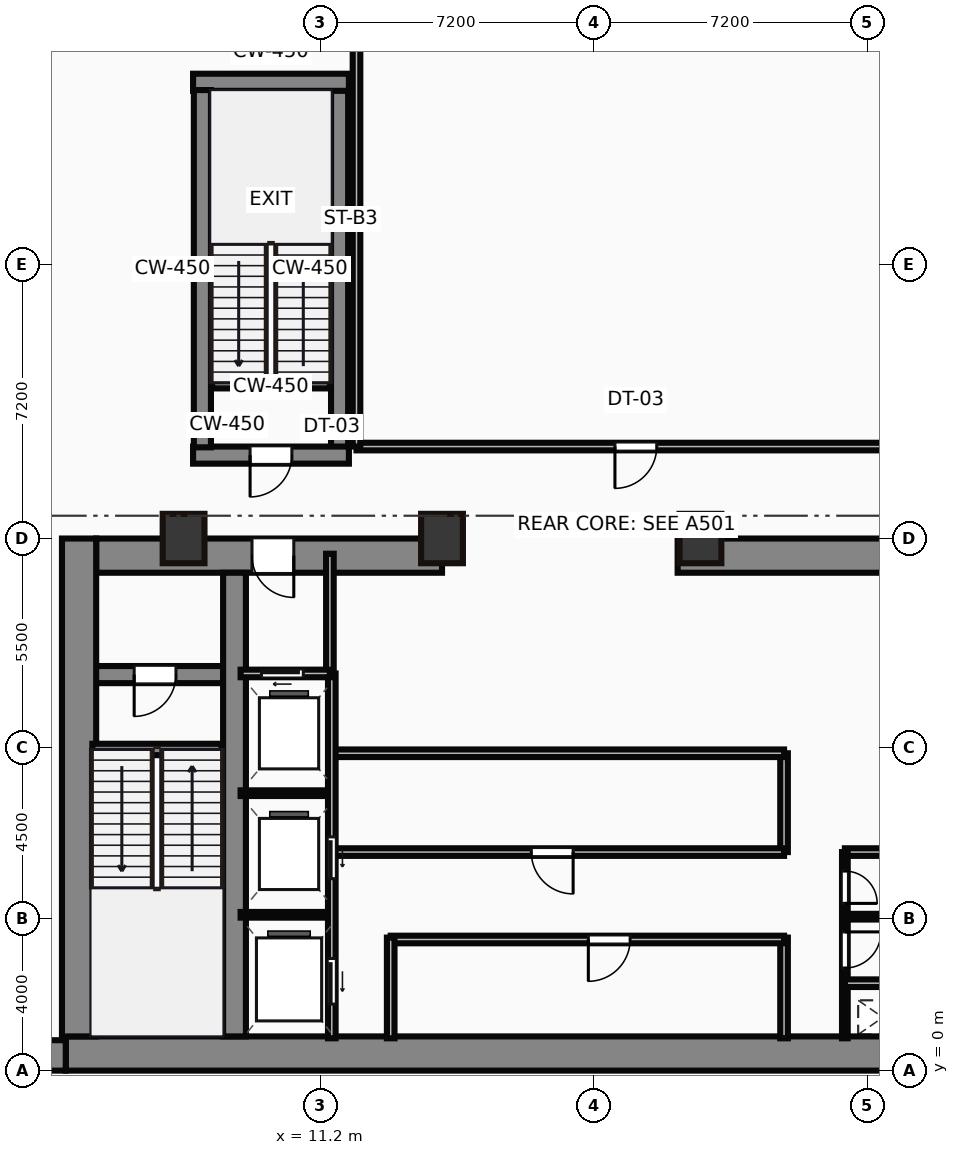
"""IFC4 building model, lengths in metres.
Left out: names, types, materials, properties, quantities, classifications, styles, units other than length and angle.
Written with IfcOpenShell. Run it as: python <this file> out.ifc"""

import sys

from ifc_helpers import new_model, si_unit, direction, frame, frame_2d, origin, origin_2d, place, context, subcontext, project, spatial, rectangle, hollow_rectangle, extrude, source, transform, mapped, element, fill, save


model = new_model("IFC4")
c1 = context("Model", 3, precision=1e-05, world=origin(), true_north=direction((0.0, 1.0)))
c2 = subcontext(c1, "Body", "Model", "MODEL_VIEW")
j1 = project(units=[si_unit("LENGTHUNIT", "METRE"), si_unit("PLANEANGLEUNIT", "RADIAN")], contexts=[c1])
p1 = place(None, origin())
s1 = spatial("IfcSite", under=j1, at=p1, CompositionType="ELEMENT")
p2 = place(p1, origin())
s2 = spatial("IfcBuilding", under=s1, at=p2, CompositionType="ELEMENT")
p3 = place(p2, frame((0.0, 0.0, -10.0)))
s3 = spatial("IfcBuildingStorey", under=s2, at=p3, CompositionType="ELEMENT", Elevation=-10.0)
m1 = source(origin(), c2, "Body", "SweptSolid", [
    extrude(rectangle(XDim=4.5, YDim=0.8, at=frame_2d((2.25, 0.0))), origin(), (0.0, 0.0, 1.0), 5.0),
])
p4 = place(p3, frame((0.0, 0.4, 0.0), z_axis=(0.0, 0.0, 1.0), x_axis=(1.0, 0.0, 0.0)))
e1 = element("IfcWall", 1, at=p4, inside=s3, PredefinedType="USERDEFINED", context=c2, shape_type="MappedRepresentation", body=[
    mapped(m1, transform((0.0, 0.0, 0.0))),
])
m2 = source(origin(), c2, "Body", "SweptSolid", [
    extrude(rectangle(XDim=29.5, YDim=0.9, at=frame_2d((14.75, 0.0))), origin(), (0.0, 0.0, 1.0), 5.0),
])
p5 = place(p3, frame((4.5, 0.45, 0.0), z_axis=(0.0, 0.0, 1.0), x_axis=(1.0, 0.0, 0.0)))
e2 = element("IfcWall", 2, at=p5, inside=s3, PredefinedType="SHEAR", context=c2, shape_type="MappedRepresentation", body=[
    mapped(m2, transform((0.0, 0.0, 0.0))),
])
m3 = source(origin(), c2, "Body", "SweptSolid", [
    extrude(rectangle(XDim=13.1, YDim=0.9, at=frame_2d((6.55, 0.0))), origin(), (0.0, 0.0, 1.0), 5.0),
])
p6 = place(p3, frame((4.85, 0.9, 0.0), z_axis=(0.0, 0.0, 1.0), x_axis=(0.0, 1.0, 0.0)))
e3 = element("IfcWall", 3, at=p6, inside=s3, PredefinedType="SHEAR", context=c2, shape_type="MappedRepresentation", body=[
    mapped(m3, transform((0.0, 0.0, 0.0))),
])
m4 = source(origin(), c2, "Body", "SweptSolid", [
    extrude(rectangle(XDim=9.1, YDim=0.9, at=frame_2d((4.55, 0.0))), origin(), (0.0, 0.0, 1.0), 4.55),
])
p7 = place(p3, frame((5.3, 13.55, 0.45), z_axis=(0.0, 0.0, 1.0), x_axis=(1.0, 0.0, 0.0)))
e4 = element("IfcWall", 4, at=p7, inside=s3, PredefinedType="SHEAR", context=c2, shape_type="MappedRepresentation", body=[
    mapped(m4, transform((0.0, 0.0, 0.0))),
])
p8 = place(p7, frame((4.1, 0.0, 0.0)))
e5 = element("IfcOpeningElement", 5, at=p8, cuts=e4, PredefinedType="OPENING", context=c2, shape_type="SweptSolid", body=[
    extrude(rectangle(XDim=1.1, YDim=2.15, at=frame_2d((0.55, 1.075))), frame((0.0, 0.46, 0.0), z_axis=(0.0, -1.0, 0.0), x_axis=(1.0, 0.0, 0.0)), (0.0, 0.0, 1.0), 0.92),
])
m5 = source(origin(), c2, "Body", "SweptSolid", [
    extrude(rectangle(XDim=12.6, YDim=0.9, at=frame_2d((6.3, 0.0))), origin(), (0.0, 0.0, 1.0), 4.55),
])
p9 = place(p3, frame((20.6, 13.55, 0.45), z_axis=(0.0, 0.0, 1.0), x_axis=(1.0, 0.0, 0.0)))
e6 = element("IfcWall", 6, at=p9, inside=s3, PredefinedType="SHEAR", context=c2, shape_type="MappedRepresentation", body=[
    mapped(m5, transform((0.0, 0.0, 0.0))),
])
p10 = place(p9, frame((9.25, 0.0, 0.0)))
e7 = element("IfcOpeningElement", 7, at=p10, cuts=e6, PredefinedType="OPENING", context=c2, shape_type="SweptSolid", body=[
    extrude(rectangle(XDim=1.1, YDim=2.15, at=frame_2d((0.55, 1.075))), frame((0.0, 0.46, 0.0), z_axis=(0.0, -1.0, 0.0), x_axis=(1.0, 0.0, 0.0)), (0.0, 0.0, 1.0), 0.92),
])
m6 = source(origin(), c2, "Body", "SweptSolid", [
    extrude(rectangle(XDim=12.2, YDim=0.6, at=frame_2d((6.1, 0.0))), origin(), (0.0, 0.0, 1.0), 5.0),
])
p11 = place(p3, frame((8.94, 0.9, 0.0), z_axis=(0.0, 0.0, 1.0), x_axis=(0.0, 1.0, 0.0)))
e8 = element("IfcWall", 8, at=p11, inside=s3, PredefinedType="SHEAR", context=c2, shape_type="MappedRepresentation", body=[
    mapped(m6, transform((0.0, 0.0, 0.0))),
])
m7 = source(origin(), c2, "Body", "SweptSolid", [
    extrude(rectangle(XDim=3.39, YDim=0.45, at=frame_2d((1.695, 0.0))), origin(), (0.0, 0.0, 1.0), 4.55),
])
p12 = place(p3, frame((5.25, 10.42, 0.45), z_axis=(0.0, 0.0, 1.0), x_axis=(1.0, 0.0, 0.0)))
e9 = element("IfcWall", 9, at=p12, inside=s3, PredefinedType="SHEAR", context=c2, shape_type="MappedRepresentation", body=[
    mapped(m7, transform((0.0, 0.0, 0.0))),
])
p13 = place(p12, frame((1.05, 0.0, 0.0)))
e10 = element("IfcOpeningElement", 10, at=p13, cuts=e9, PredefinedType="OPENING", context=c2, shape_type="SweptSolid", body=[
    extrude(rectangle(XDim=1.1, YDim=2.15, at=frame_2d((0.55, 1.075))), frame((0.0, 0.235, 0.0), z_axis=(0.0, -1.0, 0.0), x_axis=(1.0, 0.0, 0.0)), (0.0, 0.0, 1.0), 0.47),
])
m8 = source(origin(), c2, "Body", "SweptSolid", [
    extrude(rectangle(XDim=3.4, YDim=0.3, at=frame_2d((1.7, 0.0))), origin(), (0.0, 0.0, 1.0), 0.75),
])
p14 = place(p3, frame((5.2, 8.45, -0.3), z_axis=(0.0, 0.0, 1.0), x_axis=(1.0, 0.0, 0.0)))
e11 = element("IfcWall", 11, at=p14, inside=s3, PredefinedType="SHEAR", context=c2, shape_type="MappedRepresentation", body=[
    mapped(m8, transform((0.0, 0.0, 0.0))),
])
m9 = source(origin(), c2, "Body", "SweptSolid", [
    extrude(hollow_rectangle(XDim=1.1, YDim=1.3, WallThickness=0.055, at=origin_2d()), origin(), (0.0, 0.0, 1.0), 5.0),
])
for number, where, z_axis, x_axis in (
    (12, (7.6, 14.0, 0.0), (0.0, 0.0, 1.0), (1.0, 0.0, 0.0)),
    (13, (14.4, 14.0, 0.0), (0.0, 0.0, 1.0), (1.0, 0.0, 0.0)),
    (14, (21.2, 14.0, 0.0), (0.0, 0.0, 1.0), (1.0, 0.0, 0.0)),
):
    element("IfcColumn", number, at=place(p3, frame(where, z_axis=z_axis, x_axis=x_axis)), inside=s3, PredefinedType="PILASTER", context=c2, shape_type="MappedRepresentation", body=[
        mapped(m9, transform((0.0, 0.0, 0.0))),
    ])
m10 = source(origin(), c2, "Body", "SweptSolid", [
    extrude(rectangle(XDim=4.1, YDim=0.45, at=frame_2d((2.05, 0.0))), origin(), (0.0, 0.0, 1.0), 4.55),
])
p15 = place(p3, frame((7.85, 16.195, 0.45), z_axis=(0.0, 0.0, 1.0), x_axis=(1.0, 0.0, 0.0)))
e15 = element("IfcWall", 15, at=p15, inside=s3, PredefinedType="SHEAR", context=c2, shape_type="MappedRepresentation", body=[
    mapped(m10, transform((0.0, 0.0, 0.0))),
])
p16 = place(p15, frame((1.5, 0.0, 0.0)))
e16 = element("IfcOpeningElement", 16, at=p16, cuts=e15, PredefinedType="OPENING", context=c2, shape_type="SweptSolid", body=[
    extrude(rectangle(XDim=1.1, YDim=2.15, at=frame_2d((0.55, 1.075))), frame((0.0, 0.235, 0.0), z_axis=(0.0, -1.0, 0.0), x_axis=(1.0, 0.0, 0.0)), (0.0, 0.0, 1.0), 0.47),
])
m11 = source(origin(), c2, "Body", "SweptSolid", [
    extrude(rectangle(XDim=9.4, YDim=0.45, at=frame_2d((4.7, 0.0))), origin(), (0.0, 0.0, 1.0), 4.55),
])
for number, where, z_axis, x_axis in (
    (17, (8.095, 16.4, 0.45), (0.0, 0.0, 1.0), (0.0, 1.0, 0.0)),
    (18, (11.705, 16.4, 0.45), (0.0, 0.0, 1.0), (0.0, 1.0, 0.0)),
):
    element("IfcWall", number, at=place(p3, frame(where, z_axis=z_axis, x_axis=x_axis)), inside=s3, PredefinedType="SHEAR", context=c2, shape_type="MappedRepresentation", body=[
        mapped(m11, transform((0.0, 0.0, 0.0))),
    ])
p17 = place(p3, frame((7.85, 26.005, 0.45), z_axis=(0.0, 0.0, 1.0), x_axis=(1.0, 0.0, 0.0)))
e19 = element("IfcWall", 19, at=p17, inside=s3, PredefinedType="SHEAR", context=c2, shape_type="MappedRepresentation", body=[
    mapped(m10, transform((0.0, 0.0, 0.0))),
])
m12 = source(origin(), c2, "Body", "SweptSolid", [
    extrude(rectangle(XDim=3.1, YDim=0.3, at=frame_2d((1.55, 0.0))), origin(), (0.0, 0.0, 1.0), 0.3),
])
p18 = place(p3, frame((11.45, 18.1, -0.3), z_axis=(0.0, 0.0, 1.0), x_axis=(-1.0, 0.0, 0.0)))
e20 = element("IfcWall", 20, at=p18, inside=s3, PredefinedType="SHEAR", context=c2, shape_type="MappedRepresentation", body=[
    mapped(m12, transform((0.0, 0.0, 0.0))),
])
m13 = source(origin(), c2, "Body", "SweptSolid", [
    extrude(rectangle(XDim=3.18, YDim=0.2, at=frame_2d((1.59, 0.0))), origin(), (0.0, 0.0, 1.0), 4.25),
])
p19 = place(p3, frame((11.45, 10.42, 0.45), z_axis=(0.0, 0.0, 1.0), x_axis=(0.0, 1.0, 0.0)))
e21 = element("IfcWall", 21, at=p19, inside=s3, PredefinedType="PARTITIONING", context=c2, shape_type="MappedRepresentation", body=[
    mapped(m13, transform((0.0, 0.0, 0.0))),
])
m14 = source(origin(), c2, "Body", "SweptSolid", [
    extrude(rectangle(XDim=2.35, YDim=0.2, at=frame_2d((1.175, 0.0))), origin(), (0.0, 0.0, 1.0), 4.25),
])
p20 = place(p3, frame((9.1, 10.45, 0.45), z_axis=(0.0, 0.0, 1.0), x_axis=(1.0, 0.0, 0.0)))
e22 = element("IfcWall", 22, at=p20, inside=s3, PredefinedType="PARTITIONING", context=c2, shape_type="MappedRepresentation", body=[
    mapped(m14, transform((0.0, 0.0, 0.0))),
])
p21 = place(p20, frame((0.55, 0.0, 0.0)))
e23 = element("IfcOpeningElement", 23, at=p21, cuts=e22, PredefinedType="OPENING", context=c2, shape_type="SweptSolid", body=[
    extrude(rectangle(XDim=1.1, YDim=2.15, at=frame_2d((0.55, 1.075))), frame((0.0, 0.11, 0.0), z_axis=(0.0, -1.0, 0.0), x_axis=(1.0, 0.0, 0.0)), (0.0, 0.0, 1.0), 0.22),
])
m15 = source(origin(), c2, "Body", "SweptSolid", [
    extrude(rectangle(XDim=9.6, YDim=0.2, at=frame_2d((4.8, 0.0))), origin(), (0.0, 0.0, 1.0), 4.25),
])
p22 = place(p3, frame((11.5, 0.85, 0.45), z_axis=(0.0, 0.0, 1.0), x_axis=(0.0, 1.0, 0.0)))
e24 = element("IfcWall", 24, at=p22, inside=s3, PredefinedType="PARTITIONING", context=c2, shape_type="MappedRepresentation", body=[
    mapped(m15, transform((0.0, 0.0, 0.0))),
])
p23 = place(p22, frame((4.2, 0.0, 0.0)))
e25 = element("IfcOpeningElement", 25, at=p23, cuts=e24, PredefinedType="OPENING", context=c2, shape_type="SweptSolid", body=[
    extrude(rectangle(XDim=1.1, YDim=2.15, at=frame_2d((0.55, 1.075))), frame((0.0, 0.11, 0.0), z_axis=(0.0, -1.0, 0.0), x_axis=(1.0, 0.0, 0.0)), (0.0, 0.0, 1.0), 0.22),
])
p24 = place(p22, frame((0.9, 0.0, 0.0)))
e26 = element("IfcOpeningElement", 26, at=p24, cuts=e24, PredefinedType="OPENING", context=c2, shape_type="SweptSolid", body=[
    extrude(rectangle(XDim=1.2, YDim=2.15, at=frame_2d((0.6, 1.075))), frame((0.0, 0.11, 0.0), z_axis=(0.0, -1.0, 0.0), x_axis=(1.0, 0.0, 0.0)), (0.0, 0.0, 1.0), 0.22),
])
m16 = source(origin(), c2, "Body", "SweptSolid", [
    extrude(rectangle(XDim=2.4, YDim=0.15, at=frame_2d((1.2, 0.0))), origin(), (0.0, 0.0, 1.0), 4.25),
])
for number, where, z_axis, x_axis in (
    (27, (9.1, 4.1, 0.45), (0.0, 0.0, 1.0), (1.0, 0.0, 0.0)),
    (28, (9.1, 7.3, 0.45), (0.0, 0.0, 1.0), (1.0, 0.0, 0.0)),
):
    element("IfcWall", number, at=place(p3, frame(where, z_axis=z_axis, x_axis=x_axis)), inside=s3, PredefinedType="PARTITIONING", context=c2, shape_type="MappedRepresentation", body=[
        mapped(m16, transform((0.0, 0.0, 0.0))),
    ])
m17 = source(origin(), c2, "Body", "SweptSolid", [
    extrude(rectangle(XDim=2.65, YDim=0.2, at=frame_2d((1.325, 0.0))), origin(), (0.0, 0.0, 1.0), 4.25),
])
p25 = place(p3, frame((13.05, 0.85, 0.45), z_axis=(0.0, 0.0, 1.0), x_axis=(0.0, 1.0, 0.0)))
e29 = element("IfcWall", 29, at=p25, inside=s3, PredefinedType="PARTITIONING", context=c2, shape_type="MappedRepresentation", body=[
    mapped(m17, transform((0.0, 0.0, 0.0))),
])
m18 = source(origin(), c2, "Body", "SweptSolid", [
    extrude(rectangle(XDim=10.35, YDim=0.2, at=frame_2d((5.175, 0.0))), origin(), (0.0, 0.0, 1.0), 4.25),
])
p26 = place(p3, frame((13.05, 3.45, 0.45), z_axis=(0.0, 0.0, 1.0), x_axis=(1.0, 0.0, 0.0)))
e30 = element("IfcWall", 30, at=p26, inside=s3, PredefinedType="PARTITIONING", context=c2, shape_type="MappedRepresentation", body=[
    mapped(m18, transform((0.0, 0.0, 0.0))),
])
p27 = place(p26, frame((5.2, 0.0, 0.0)))
e31 = element("IfcOpeningElement", 31, at=p27, cuts=e30, PredefinedType="OPENING", context=c2, shape_type="SweptSolid", body=[
    extrude(rectangle(XDim=1.1, YDim=2.15, at=frame_2d((0.55, 1.075))), frame((0.0, 0.11, 0.0), z_axis=(0.0, -1.0, 0.0), x_axis=(1.0, 0.0, 0.0)), (0.0, 0.0, 1.0), 0.22),
])
p28 = place(p3, frame((23.4, 0.85, 0.45), z_axis=(0.0, 0.0, 1.0), x_axis=(0.0, 1.0, 0.0)))
e32 = element("IfcWall", 32, at=p28, inside=s3, PredefinedType="PARTITIONING", context=c2, shape_type="MappedRepresentation", body=[
    mapped(m17, transform((0.0, 0.0, 0.0))),
])
m19 = source(origin(), c2, "Body", "SweptSolid", [
    extrude(rectangle(XDim=11.85, YDim=0.2, at=frame_2d((5.925, 0.0))), origin(), (0.0, 0.0, 1.0), 4.25),
])
p29 = place(p3, frame((11.55, 5.75, 0.45), z_axis=(0.0, 0.0, 1.0), x_axis=(1.0, 0.0, 0.0)))
e33 = element("IfcWall", 33, at=p29, inside=s3, PredefinedType="PARTITIONING", context=c2, shape_type="MappedRepresentation", body=[
    mapped(m19, transform((0.0, 0.0, 0.0))),
])
p30 = place(p29, frame((5.2, 0.0, 0.0)))
e34 = element("IfcOpeningElement", 34, at=p30, cuts=e33, PredefinedType="OPENING", context=c2, shape_type="SweptSolid", body=[
    extrude(rectangle(XDim=1.1, YDim=2.15, at=frame_2d((0.55, 1.075))), frame((0.0, 0.11, 0.0), z_axis=(0.0, -1.0, 0.0), x_axis=(1.0, 0.0, 0.0)), (0.0, 0.0, 1.0), 0.22),
])
p31 = place(p3, frame((11.55, 8.35, 0.45), z_axis=(0.0, 0.0, 1.0), x_axis=(1.0, 0.0, 0.0)))
e35 = element("IfcWall", 35, at=p31, inside=s3, PredefinedType="PARTITIONING", context=c2, shape_type="MappedRepresentation", body=[
    mapped(m19, transform((0.0, 0.0, 0.0))),
])
m20 = source(origin(), c2, "Body", "SweptSolid", [
    extrude(rectangle(XDim=2.6, YDim=0.2, at=frame_2d((1.3, 0.0))), origin(), (0.0, 0.0, 1.0), 4.25),
])
p32 = place(p3, frame((23.4, 5.75, 0.45), z_axis=(0.0, 0.0, 1.0), x_axis=(0.0, 1.0, 0.0)))
e36 = element("IfcWall", 36, at=p32, inside=s3, PredefinedType="PARTITIONING", context=c2, shape_type="MappedRepresentation", body=[
    mapped(m20, transform((0.0, 0.0, 0.0))),
])
m21 = source(origin(), c2, "Body", "SweptSolid", [
    extrude(rectangle(XDim=4.9, YDim=0.15, at=frame_2d((2.45, 0.0))), origin(), (0.0, 0.0, 1.0), 4.25),
])
p33 = place(p3, frame((25.0, 0.85, 0.45), z_axis=(0.0, 0.0, 1.0), x_axis=(0.0, 1.0, 0.0)))
e37 = element("IfcWall", 37, at=p33, inside=s3, PredefinedType="PARTITIONING", context=c2, shape_type="MappedRepresentation", body=[
    mapped(m21, transform((0.0, 0.0, 0.0))),
])
p34 = place(p33, frame((1.85, 0.0, 0.0)))
e38 = element("IfcOpeningElement", 38, at=p34, cuts=e37, PredefinedType="OPENING", context=c2, shape_type="SweptSolid", body=[
    extrude(rectangle(XDim=0.95, YDim=2.15, at=frame_2d((0.475, 1.075))), frame((0.0, 0.085, 0.0), z_axis=(0.0, -1.0, 0.0), x_axis=(1.0, 0.0, 0.0)), (0.0, 0.0, 1.0), 0.17),
])
p35 = place(p33, frame((3.55, 0.0, 0.0)))
e39 = element("IfcOpeningElement", 39, at=p35, cuts=e37, PredefinedType="OPENING", context=c2, shape_type="SweptSolid", body=[
    extrude(rectangle(XDim=0.85, YDim=2.15, at=frame_2d((0.425, 1.075))), frame((0.0, 0.085, 0.0), z_axis=(0.0, -1.0, 0.0), x_axis=(1.0, 0.0, 0.0)), (0.0, 0.0, 1.0), 0.17),
])
m22 = source(origin(), c2, "Body", "SweptSolid", [
    extrude(rectangle(XDim=4.6, YDim=0.2, at=frame_2d((2.3, 0.0))), origin(), (0.0, 0.0, 1.0), 4.25),
])
p36 = place(p3, frame((25.0, 5.75, 0.45), z_axis=(0.0, 0.0, 1.0), x_axis=(1.0, 0.0, 0.0)))
e40 = element("IfcWall", 40, at=p36, inside=s3, PredefinedType="PARTITIONING", context=c2, shape_type="MappedRepresentation", body=[
    mapped(m22, transform((0.0, 0.0, 0.0))),
])
m23 = source(origin(), c2, "Body", "SweptSolid", [
    extrude(rectangle(XDim=2.4, YDim=0.2, at=frame_2d((1.2, 0.0))), origin(), (0.0, 0.0, 1.0), 4.25),
])
p37 = place(p3, frame((25.0, 2.3, 0.45), z_axis=(0.0, 0.0, 1.0), x_axis=(1.0, 0.0, 0.0)))
e41 = element("IfcWall", 41, at=p37, inside=s3, PredefinedType="PARTITIONING", context=c2, shape_type="MappedRepresentation", body=[
    mapped(m23, transform((0.0, 0.0, 0.0))),
])
m24 = source(origin(), c2, "Body", "SweptSolid", [
    extrude(rectangle(XDim=4.55, YDim=0.15, at=frame_2d((2.275, 0.0))), origin(), (0.0, 0.0, 1.0), 4.25),
])
p38 = place(p3, frame((25.0, 4.05, 0.45), z_axis=(0.0, 0.0, 1.0), x_axis=(1.0, 0.0, 0.0)))
e42 = element("IfcWall", 42, at=p38, inside=s3, PredefinedType="PARTITIONING", context=c2, shape_type="MappedRepresentation", body=[
    mapped(m24, transform((0.0, 0.0, 0.0))),
])
m25 = source(origin(), c2, "Body", "SweptSolid", [
    extrude(rectangle(XDim=47.0, YDim=0.2, at=frame_2d((23.5, 0.0))), origin(), (0.0, 0.0, 1.0), 4.25),
])
p39 = place(p3, frame((12.15, 16.42, 0.45), z_axis=(0.0, 0.0, 1.0), x_axis=(1.0, 0.0, 0.0)))
e43 = element("IfcWall", 43, at=p39, inside=s3, PredefinedType="PARTITIONING", context=c2, shape_type="MappedRepresentation", body=[
    mapped(m25, transform((0.0, 0.0, 0.0))),
])
p40 = place(p39, frame((6.8, 0.0, 0.0)))
e44 = element("IfcOpeningElement", 44, at=p40, cuts=e43, PredefinedType="OPENING", context=c2, shape_type="SweptSolid", body=[
    extrude(rectangle(XDim=1.1, YDim=2.15, at=frame_2d((0.55, 1.075))), frame((0.0, 0.11, 0.0), z_axis=(0.0, -1.0, 0.0), x_axis=(1.0, 0.0, 0.0)), (0.0, 0.0, 1.0), 0.22),
])
p41 = place(p39, frame((34.2, 0.0, 0.0)))
e45 = element("IfcOpeningElement", 45, at=p41, cuts=e43, PredefinedType="OPENING", context=c2, shape_type="SweptSolid", body=[
    extrude(rectangle(XDim=1.1, YDim=2.15, at=frame_2d((0.55, 1.075))), frame((0.0, 0.11, 0.0), z_axis=(0.0, -1.0, 0.0), x_axis=(1.0, 0.0, 0.0)), (0.0, 0.0, 1.0), 0.22),
])
m26 = source(origin(), c2, "Body", "SweptSolid", [
    extrude(rectangle(XDim=30.43, YDim=0.2, at=frame_2d((15.215, 0.0))), origin(), (0.0, 0.0, 1.0), 4.25),
])
p42 = place(p3, frame((12.15, 16.42, 0.45), z_axis=(0.0, 0.0, 1.0), x_axis=(0.0, 1.0, 0.0)))
e46 = element("IfcWall", 46, at=p42, inside=s3, PredefinedType="PARTITIONING", context=c2, shape_type="MappedRepresentation", body=[
    mapped(m26, transform((0.0, 0.0, 0.0))),
])
m27 = source(origin(), c2, "Body", "SweptSolid", [
    extrude(rectangle(XDim=1.1, YDim=2.15, at=frame_2d((0.55, 1.075))), frame((0.0, 0.025, 0.0), z_axis=(0.0, -1.0, 0.0), x_axis=(1.0, 0.0, 0.0)), (0.0, 0.0, 1.0), 0.05),
])
p43 = place(p13, frame((1.1, 0.0, 0.0), z_axis=(0.0, 0.0, 1.0), x_axis=(-1.0, 0.0, 0.0)))
e47 = element("IfcDoor", 47, at=p43, inside=s3, OperationType="SINGLE_SWING_LEFT", PredefinedType="DOOR", context=c2, shape_type="MappedRepresentation", body=[
    mapped(m27, transform((0.0, 0.0, 0.0))),
])
fill(e10, e47)
p44 = place(p8, origin())
e48 = element("IfcDoor", 48, at=p44, inside=s3, OperationType="SINGLE_SWING_RIGHT", PredefinedType="DOOR", context=c2, shape_type="MappedRepresentation", body=[
    mapped(m27, transform((0.0, 0.0, 0.0))),
])
fill(e5, e48)
p45 = place(p21, origin())
e49 = element("IfcDoor", 49, at=p45, inside=s3, OperationType="SLIDING_TO_LEFT", PredefinedType="DOOR", context=c2, shape_type="MappedRepresentation", body=[
    mapped(m27, transform((0.0, 0.0, 0.0))),
])
fill(e23, e49)
p46 = place(p23, frame((1.1, 0.0, 0.0), z_axis=(0.0, 0.0, 1.0), x_axis=(-1.0, 0.0, 0.0)))
e50 = element("IfcDoor", 50, at=p46, inside=s3, OperationType="SLIDING_TO_LEFT", PredefinedType="DOOR", context=c2, shape_type="MappedRepresentation", body=[
    mapped(m27, transform((0.0, 0.0, 0.0))),
])
fill(e25, e50)
m28 = source(origin(), c2, "Body", "SweptSolid", [
    extrude(rectangle(XDim=1.2, YDim=2.15, at=frame_2d((0.6, 1.075))), frame((0.0, 0.025, 0.0), z_axis=(0.0, -1.0, 0.0), x_axis=(1.0, 0.0, 0.0)), (0.0, 0.0, 1.0), 0.05),
])
p47 = place(p24, frame((1.2, 0.0, 0.0), z_axis=(0.0, 0.0, 1.0), x_axis=(-1.0, 0.0, 0.0)))
e51 = element("IfcDoor", 51, at=p47, inside=s3, OperationType="SLIDING_TO_LEFT", PredefinedType="DOOR", context=c2, shape_type="MappedRepresentation", body=[
    mapped(m28, transform((0.0, 0.0, 0.0))),
])
fill(e26, e51)
p48 = place(p27, origin())
e52 = element("IfcDoor", 52, at=p48, inside=s3, OperationType="SINGLE_SWING_LEFT", PredefinedType="DOOR", context=c2, shape_type="MappedRepresentation", body=[
    mapped(m27, transform((0.0, 0.0, 0.0))),
])
fill(e31, e52)
p49 = place(p30, frame((1.1, 0.0, 0.0), z_axis=(0.0, 0.0, 1.0), x_axis=(-1.0, 0.0, 0.0)))
e53 = element("IfcDoor", 53, at=p49, inside=s3, OperationType="SINGLE_SWING_RIGHT", PredefinedType="DOOR", context=c2, shape_type="MappedRepresentation", body=[
    mapped(m27, transform((0.0, 0.0, 0.0))),
])
fill(e34, e53)
m29 = source(origin(), c2, "Body", "SweptSolid", [
    extrude(rectangle(XDim=0.95, YDim=2.15, at=frame_2d((0.475, 1.075))), frame((0.0, 0.025, 0.0), z_axis=(0.0, -1.0, 0.0), x_axis=(1.0, 0.0, 0.0)), (0.0, 0.0, 1.0), 0.05),
])
p50 = place(p34, origin())
e54 = element("IfcDoor", 54, at=p50, inside=s3, OperationType="SINGLE_SWING_RIGHT", PredefinedType="DOOR", context=c2, shape_type="MappedRepresentation", body=[
    mapped(m29, transform((0.0, 0.0, 0.0))),
])
fill(e38, e54)
m30 = source(origin(), c2, "Body", "SweptSolid", [
    extrude(rectangle(XDim=0.85, YDim=2.15, at=frame_2d((0.425, 1.075))), frame((0.0, 0.025, 0.0), z_axis=(0.0, -1.0, 0.0), x_axis=(1.0, 0.0, 0.0)), (0.0, 0.0, 1.0), 0.05),
])
p51 = place(p35, origin())
e55 = element("IfcDoor", 55, at=p51, inside=s3, OperationType="SINGLE_SWING_LEFT", PredefinedType="DOOR", context=c2, shape_type="MappedRepresentation", body=[
    mapped(m30, transform((0.0, 0.0, 0.0))),
])
fill(e39, e55)
p52 = place(p40, origin())
e56 = element("IfcDoor", 56, at=p52, inside=s3, OperationType="SINGLE_SWING_LEFT", PredefinedType="DOOR", context=c2, shape_type="MappedRepresentation", body=[
    mapped(m27, transform((0.0, 0.0, 0.0))),
])
fill(e44, e56)
p53 = place(p16, origin())
e57 = element("IfcDoor", 57, at=p53, inside=s3, OperationType="SINGLE_SWING_LEFT", PredefinedType="DOOR", context=c2, shape_type="MappedRepresentation", body=[
    mapped(m27, transform((0.0, 0.0, 0.0))),
])
fill(e16, e57)
save(model, sys.argv[1])
